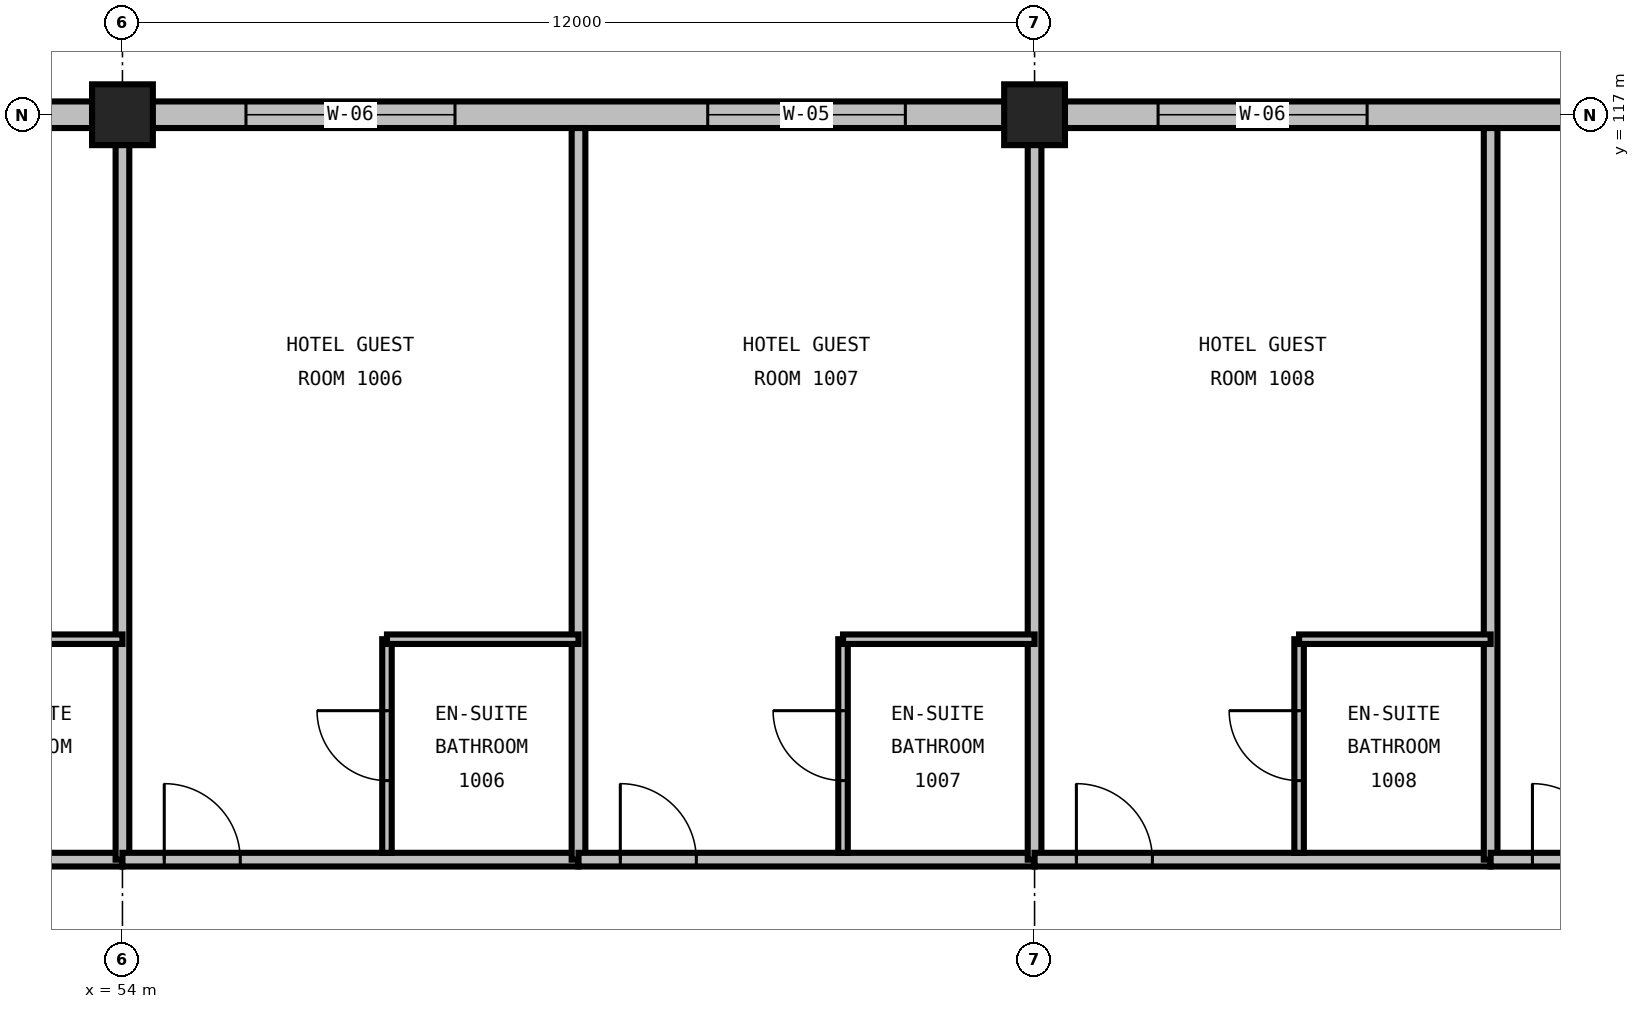
"""IFC4 building model, lengths in metres.
Left out: names, types, materials, properties, quantities, classifications, styles, units other than length and angle.
Written with IfcOpenShell. Run it as: python <this file> out.ifc"""

import sys

from ifc_helpers import new_model, si_unit, direction, frame, frame_2d, origin, origin_2d, place, context, subcontext, project, spatial, rectangle, extrude, element, fill, save


model = new_model("IFC4")
c1 = context("Model", 3, precision=1e-05, world=origin(), true_north=direction((0.0, 1.0)))
c2 = subcontext(c1, "Body", "Model", "MODEL_VIEW")
j1 = project(units=[si_unit("LENGTHUNIT", "METRE"), si_unit("PLANEANGLEUNIT", "RADIAN")], contexts=[c1])
p1 = place(None, origin())
s1 = spatial("IfcSite", under=j1, at=p1, CompositionType="ELEMENT")
p2 = place(p1, origin())
s2 = spatial("IfcBuilding", under=s1, at=p2, CompositionType="ELEMENT")
p3 = place(p2, frame((0.0, 0.0, 45.6)))
s3 = spatial("IfcBuildingStorey", under=s2, at=p3, CompositionType="ELEMENT", Elevation=45.6)
for number, where, z_axis, x_axis in (
    (1, (54.0, 117.0, 0.0), (0.0, 0.0, 1.0), (1.0, 0.0, 0.0)),
    (2, (66.0, 117.0, 0.0), (0.0, 0.0, 1.0), (1.0, 0.0, 0.0)),
):
    element("IfcColumn", number, at=place(p3, frame(where, z_axis=z_axis, x_axis=x_axis)), inside=s3, PredefinedType="COLUMN", context=c2, shape_type="SweptSolid", body=[
        extrude(rectangle(XDim=0.8, YDim=0.8, at=origin_2d()), origin(), (0.0, 0.0, 1.0), 3.6),
    ])
p4 = place(p3, frame((54.0, 117.0, 0.0), z_axis=(0.0, 0.0, 1.0), x_axis=(-1.0, 0.0, 0.0)))
e3 = element("IfcWall", 3, at=p4, inside=s3, PredefinedType="STANDARD", context=c2, shape_type="SweptSolid", body=[
    extrude(rectangle(XDim=12.0, YDim=0.35, at=frame_2d((6.0, 0.0))), origin(), (0.0, 0.0, 1.0), 2.486),
])
p5 = place(p4, frame((1.7, 0.0, 0.72)))
e4 = element("IfcOpeningElement", 4, at=p5, cuts=e3, PredefinedType="OPENING", context=c2, shape_type="SweptSolid", body=[
    extrude(rectangle(XDim=2.6, YDim=1.69, at=frame_2d((1.3, 0.845))), frame((0.0, 0.19, 0.0), z_axis=(0.0, -1.0, 0.0), x_axis=(1.0, 0.0, 0.0)), (0.0, 0.0, 1.0), 0.38),
])
p6 = place(p4, frame((7.625, 0.0, 0.72)))
e5 = element("IfcOpeningElement", 5, at=p6, cuts=e3, PredefinedType="OPENING", context=c2, shape_type="SweptSolid", body=[
    extrude(rectangle(XDim=2.75, YDim=1.69, at=frame_2d((1.375, 0.845))), frame((0.0, 0.19, 0.0), z_axis=(0.0, -1.0, 0.0), x_axis=(1.0, 0.0, 0.0)), (0.0, 0.0, 1.0), 0.38),
])
p7 = place(p3, frame((66.0, 117.0, 0.0), z_axis=(0.0, 0.0, 1.0), x_axis=(-1.0, 0.0, 0.0)))
e6 = element("IfcWall", 6, at=p7, inside=s3, PredefinedType="STANDARD", context=c2, shape_type="SweptSolid", body=[
    extrude(rectangle(XDim=12.0, YDim=0.35, at=frame_2d((6.0, 0.0))), origin(), (0.0, 0.0, 1.0), 2.486),
])
p8 = place(p7, frame((1.7, 0.0, 0.72)))
e7 = element("IfcOpeningElement", 7, at=p8, cuts=e6, PredefinedType="OPENING", context=c2, shape_type="SweptSolid", body=[
    extrude(rectangle(XDim=2.6, YDim=1.69, at=frame_2d((1.3, 0.845))), frame((0.0, 0.19, 0.0), z_axis=(0.0, -1.0, 0.0), x_axis=(1.0, 0.0, 0.0)), (0.0, 0.0, 1.0), 0.38),
])
p9 = place(p7, frame((7.625, 0.0, 0.72)))
e8 = element("IfcOpeningElement", 8, at=p9, cuts=e6, PredefinedType="OPENING", context=c2, shape_type="SweptSolid", body=[
    extrude(rectangle(XDim=2.75, YDim=1.69, at=frame_2d((1.375, 0.845))), frame((0.0, 0.19, 0.0), z_axis=(0.0, -1.0, 0.0), x_axis=(1.0, 0.0, 0.0)), (0.0, 0.0, 1.0), 0.38),
])
p10 = place(p3, frame((78.0, 117.0, 0.0), z_axis=(0.0, 0.0, 1.0), x_axis=(-1.0, 0.0, 0.0)))
e9 = element("IfcWall", 9, at=p10, inside=s3, PredefinedType="STANDARD", context=c2, shape_type="SweptSolid", body=[
    extrude(rectangle(XDim=12.0, YDim=0.35, at=frame_2d((6.0, 0.0))), origin(), (0.0, 0.0, 1.0), 2.486),
])
p11 = place(p10, frame((1.7, 0.0, 0.72)))
e10 = element("IfcOpeningElement", 10, at=p11, cuts=e9, PredefinedType="OPENING", context=c2, shape_type="SweptSolid", body=[
    extrude(rectangle(XDim=2.6, YDim=1.69, at=frame_2d((1.3, 0.845))), frame((0.0, 0.19, 0.0), z_axis=(0.0, -1.0, 0.0), x_axis=(1.0, 0.0, 0.0)), (0.0, 0.0, 1.0), 0.38),
])
p12 = place(p10, frame((7.625, 0.0, 0.72)))
e11 = element("IfcOpeningElement", 11, at=p12, cuts=e9, PredefinedType="OPENING", context=c2, shape_type="SweptSolid", body=[
    extrude(rectangle(XDim=2.75, YDim=1.69, at=frame_2d((1.375, 0.845))), frame((0.0, 0.19, 0.0), z_axis=(0.0, -1.0, 0.0), x_axis=(1.0, 0.0, 0.0)), (0.0, 0.0, 1.0), 0.38),
])
p13 = place(p3, frame((48.0, 107.2, 0.0), z_axis=(0.0, 0.0, 1.0), x_axis=(1.0, 0.0, 0.0)))
e12 = element("IfcWall", 12, at=p13, inside=s3, PredefinedType="PARTITIONING", context=c2, shape_type="SweptSolid", body=[
    extrude(rectangle(XDim=6.0, YDim=0.18, at=frame_2d((3.0, 0.0))), origin(), (0.0, 0.0, 1.0), 3.29),
])
p14 = place(p13, frame((0.55, 0.0, 0.0)))
e13 = element("IfcOpeningElement", 13, at=p14, cuts=e12, PredefinedType="OPENING", context=c2, shape_type="SweptSolid", body=[
    extrude(rectangle(XDim=1.0, YDim=2.15, at=frame_2d((0.5, 1.075))), frame((0.0, 0.105, 0.0), z_axis=(0.0, -1.0, 0.0), x_axis=(1.0, 0.0, 0.0)), (0.0, 0.0, 1.0), 0.21),
])
p15 = place(p3, frame((54.0, 107.2, 0.0), z_axis=(0.0, 0.0, 1.0), x_axis=(0.0, 1.0, 0.0)))
e14 = element("IfcWall", 14, at=p15, inside=s3, PredefinedType="PARTITIONING", context=c2, shape_type="SweptSolid", body=[
    extrude(rectangle(XDim=9.625, YDim=0.18, at=frame_2d((4.812, 0.0))), origin(), (0.0, 0.0, 1.0), 2.59),
])
p16 = place(p3, frame((51.48, 110.1, 0.0), z_axis=(0.0, 0.0, 1.0), x_axis=(1.0, 0.0, 0.0)))
e15 = element("IfcWall", 15, at=p16, inside=s3, PredefinedType="PARTITIONING", context=c2, shape_type="SweptSolid", body=[
    extrude(rectangle(XDim=2.52, YDim=0.125, at=frame_2d((1.26, 0.0))), origin(), (0.0, 0.0, 1.0), 3.29),
])
p17 = place(p3, frame((54.0, 107.2, 0.0), z_axis=(0.0, 0.0, 1.0), x_axis=(1.0, 0.0, 0.0)))
e16 = element("IfcWall", 16, at=p17, inside=s3, PredefinedType="PARTITIONING", context=c2, shape_type="SweptSolid", body=[
    extrude(rectangle(XDim=6.0, YDim=0.18, at=frame_2d((3.0, 0.0))), origin(), (0.0, 0.0, 1.0), 3.29),
])
p18 = place(p17, frame((0.55, 0.0, 0.0)))
e17 = element("IfcOpeningElement", 17, at=p18, cuts=e16, PredefinedType="OPENING", context=c2, shape_type="SweptSolid", body=[
    extrude(rectangle(XDim=1.0, YDim=2.15, at=frame_2d((0.5, 1.075))), frame((0.0, 0.105, 0.0), z_axis=(0.0, -1.0, 0.0), x_axis=(1.0, 0.0, 0.0)), (0.0, 0.0, 1.0), 0.21),
])
p19 = place(p3, frame((60.0, 107.2, 0.0), z_axis=(0.0, 0.0, 1.0), x_axis=(0.0, 1.0, 0.0)))
e18 = element("IfcWall", 18, at=p19, inside=s3, PredefinedType="PARTITIONING", context=c2, shape_type="SweptSolid", body=[
    extrude(rectangle(XDim=9.625, YDim=0.18, at=frame_2d((4.812, 0.0))), origin(), (0.0, 0.0, 1.0), 3.29),
])
p20 = place(p3, frame((57.48, 107.29, 0.0), z_axis=(0.0, 0.0, 1.0), x_axis=(0.0, 1.0, 0.0)))
e19 = element("IfcWall", 19, at=p20, inside=s3, PredefinedType="PARTITIONING", context=c2, shape_type="SweptSolid", body=[
    extrude(rectangle(XDim=2.81, YDim=0.125, at=frame_2d((1.405, 0.0))), origin(), (0.0, 0.0, 1.0), 3.29),
])
p21 = place(p20, frame((0.95, 0.0, 0.0)))
e20 = element("IfcOpeningElement", 20, at=p21, cuts=e19, PredefinedType="OPENING", context=c2, shape_type="SweptSolid", body=[
    extrude(rectangle(XDim=0.92, YDim=2.1, at=frame_2d((0.46, 1.05))), frame((0.0, 0.077, 0.0), z_axis=(0.0, -1.0, 0.0), x_axis=(1.0, 0.0, 0.0)), (0.0, 0.0, 1.0), 0.155),
])
p22 = place(p3, frame((57.48, 110.1, 0.0), z_axis=(0.0, 0.0, 1.0), x_axis=(1.0, 0.0, 0.0)))
e21 = element("IfcWall", 21, at=p22, inside=s3, PredefinedType="PARTITIONING", context=c2, shape_type="SweptSolid", body=[
    extrude(rectangle(XDim=2.52, YDim=0.125, at=frame_2d((1.26, 0.0))), origin(), (0.0, 0.0, 1.0), 3.29),
])
p23 = place(p3, frame((60.0, 107.2, 0.0), z_axis=(0.0, 0.0, 1.0), x_axis=(1.0, 0.0, 0.0)))
e22 = element("IfcWall", 22, at=p23, inside=s3, PredefinedType="PARTITIONING", context=c2, shape_type="SweptSolid", body=[
    extrude(rectangle(XDim=6.0, YDim=0.18, at=frame_2d((3.0, 0.0))), origin(), (0.0, 0.0, 1.0), 3.29),
])
p24 = place(p23, frame((0.55, 0.0, 0.0)))
e23 = element("IfcOpeningElement", 23, at=p24, cuts=e22, PredefinedType="OPENING", context=c2, shape_type="SweptSolid", body=[
    extrude(rectangle(XDim=1.0, YDim=2.15, at=frame_2d((0.5, 1.075))), frame((0.0, 0.105, 0.0), z_axis=(0.0, -1.0, 0.0), x_axis=(1.0, 0.0, 0.0)), (0.0, 0.0, 1.0), 0.21),
])
p25 = place(p3, frame((66.0, 107.2, 0.0), z_axis=(0.0, 0.0, 1.0), x_axis=(0.0, 1.0, 0.0)))
e24 = element("IfcWall", 24, at=p25, inside=s3, PredefinedType="PARTITIONING", context=c2, shape_type="SweptSolid", body=[
    extrude(rectangle(XDim=9.625, YDim=0.18, at=frame_2d((4.812, 0.0))), origin(), (0.0, 0.0, 1.0), 2.59),
])
p26 = place(p3, frame((63.48, 107.29, 0.0), z_axis=(0.0, 0.0, 1.0), x_axis=(0.0, 1.0, 0.0)))
e25 = element("IfcWall", 25, at=p26, inside=s3, PredefinedType="PARTITIONING", context=c2, shape_type="SweptSolid", body=[
    extrude(rectangle(XDim=2.81, YDim=0.125, at=frame_2d((1.405, 0.0))), origin(), (0.0, 0.0, 1.0), 3.29),
])
p27 = place(p26, frame((0.95, 0.0, 0.0)))
e26 = element("IfcOpeningElement", 26, at=p27, cuts=e25, PredefinedType="OPENING", context=c2, shape_type="SweptSolid", body=[
    extrude(rectangle(XDim=0.92, YDim=2.1, at=frame_2d((0.46, 1.05))), frame((0.0, 0.077, 0.0), z_axis=(0.0, -1.0, 0.0), x_axis=(1.0, 0.0, 0.0)), (0.0, 0.0, 1.0), 0.155),
])
p28 = place(p3, frame((63.48, 110.1, 0.0), z_axis=(0.0, 0.0, 1.0), x_axis=(1.0, 0.0, 0.0)))
e27 = element("IfcWall", 27, at=p28, inside=s3, PredefinedType="PARTITIONING", context=c2, shape_type="SweptSolid", body=[
    extrude(rectangle(XDim=2.52, YDim=0.125, at=frame_2d((1.26, 0.0))), origin(), (0.0, 0.0, 1.0), 3.29),
])
p29 = place(p3, frame((66.0, 107.2, 0.0), z_axis=(0.0, 0.0, 1.0), x_axis=(1.0, 0.0, 0.0)))
e28 = element("IfcWall", 28, at=p29, inside=s3, PredefinedType="PARTITIONING", context=c2, shape_type="SweptSolid", body=[
    extrude(rectangle(XDim=6.0, YDim=0.18, at=frame_2d((3.0, 0.0))), origin(), (0.0, 0.0, 1.0), 3.29),
])
p30 = place(p29, frame((0.55, 0.0, 0.0)))
e29 = element("IfcOpeningElement", 29, at=p30, cuts=e28, PredefinedType="OPENING", context=c2, shape_type="SweptSolid", body=[
    extrude(rectangle(XDim=1.0, YDim=2.15, at=frame_2d((0.5, 1.075))), frame((0.0, 0.105, 0.0), z_axis=(0.0, -1.0, 0.0), x_axis=(1.0, 0.0, 0.0)), (0.0, 0.0, 1.0), 0.21),
])
p31 = place(p3, frame((72.0, 107.2, 0.0), z_axis=(0.0, 0.0, 1.0), x_axis=(0.0, 1.0, 0.0)))
e30 = element("IfcWall", 30, at=p31, inside=s3, PredefinedType="PARTITIONING", context=c2, shape_type="SweptSolid", body=[
    extrude(rectangle(XDim=9.625, YDim=0.18, at=frame_2d((4.812, 0.0))), origin(), (0.0, 0.0, 1.0), 3.29),
])
p32 = place(p3, frame((69.48, 107.29, 0.0), z_axis=(0.0, 0.0, 1.0), x_axis=(0.0, 1.0, 0.0)))
e31 = element("IfcWall", 31, at=p32, inside=s3, PredefinedType="PARTITIONING", context=c2, shape_type="SweptSolid", body=[
    extrude(rectangle(XDim=2.81, YDim=0.125, at=frame_2d((1.405, 0.0))), origin(), (0.0, 0.0, 1.0), 3.29),
])
p33 = place(p32, frame((0.95, 0.0, 0.0)))
e32 = element("IfcOpeningElement", 32, at=p33, cuts=e31, PredefinedType="OPENING", context=c2, shape_type="SweptSolid", body=[
    extrude(rectangle(XDim=0.92, YDim=2.1, at=frame_2d((0.46, 1.05))), frame((0.0, 0.077, 0.0), z_axis=(0.0, -1.0, 0.0), x_axis=(1.0, 0.0, 0.0)), (0.0, 0.0, 1.0), 0.155),
])
p34 = place(p3, frame((69.48, 110.1, 0.0), z_axis=(0.0, 0.0, 1.0), x_axis=(1.0, 0.0, 0.0)))
e33 = element("IfcWall", 33, at=p34, inside=s3, PredefinedType="PARTITIONING", context=c2, shape_type="SweptSolid", body=[
    extrude(rectangle(XDim=2.52, YDim=0.125, at=frame_2d((1.26, 0.0))), origin(), (0.0, 0.0, 1.0), 3.29),
])
p35 = place(p3, frame((72.0, 107.2, 0.0), z_axis=(0.0, 0.0, 1.0), x_axis=(1.0, 0.0, 0.0)))
e34 = element("IfcWall", 34, at=p35, inside=s3, PredefinedType="PARTITIONING", context=c2, shape_type="SweptSolid", body=[
    extrude(rectangle(XDim=6.0, YDim=0.18, at=frame_2d((3.0, 0.0))), origin(), (0.0, 0.0, 1.0), 3.29),
])
p36 = place(p35, frame((0.55, 0.0, 0.0)))
e35 = element("IfcOpeningElement", 35, at=p36, cuts=e34, PredefinedType="OPENING", context=c2, shape_type="SweptSolid", body=[
    extrude(rectangle(XDim=1.0, YDim=2.15, at=frame_2d((0.5, 1.075))), frame((0.0, 0.105, 0.0), z_axis=(0.0, -1.0, 0.0), x_axis=(1.0, 0.0, 0.0)), (0.0, 0.0, 1.0), 0.21),
])
p37 = place(p8, origin())
e36 = element("IfcWindow", 36, at=p37, inside=s3, PartitioningType="DOUBLE_PANEL_VERTICAL", PredefinedType="WINDOW", context=c2, shape_type="SweptSolid", body=[
    extrude(rectangle(XDim=2.6, YDim=1.69, at=frame_2d((1.3, 0.845))), frame((0.0, 0.03, 0.0), z_axis=(0.0, -1.0, 0.0), x_axis=(1.0, 0.0, 0.0)), (0.0, 0.0, 1.0), 0.06),
])
fill(e7, e36)
p38 = place(p9, origin())
e37 = element("IfcWindow", 37, at=p38, inside=s3, PartitioningType="TRIPLE_PANEL_VERTICAL", PredefinedType="WINDOW", context=c2, shape_type="SweptSolid", body=[
    extrude(rectangle(XDim=2.75, YDim=1.69, at=frame_2d((1.375, 0.845))), frame((0.0, 0.03, 0.0), z_axis=(0.0, -1.0, 0.0), x_axis=(1.0, 0.0, 0.0)), (0.0, 0.0, 1.0), 0.06),
])
fill(e8, e37)
p39 = place(p12, origin())
e38 = element("IfcWindow", 38, at=p39, inside=s3, PartitioningType="TRIPLE_PANEL_VERTICAL", PredefinedType="WINDOW", context=c2, shape_type="SweptSolid", body=[
    extrude(rectangle(XDim=2.75, YDim=1.69, at=frame_2d((1.375, 0.845))), frame((0.0, 0.03, 0.0), z_axis=(0.0, -1.0, 0.0), x_axis=(1.0, 0.0, 0.0)), (0.0, 0.0, 1.0), 0.06),
])
fill(e11, e38)
p40 = place(p18, origin())
e39 = element("IfcDoor", 39, at=p40, inside=s3, OperationType="SINGLE_SWING_LEFT", PredefinedType="DOOR", context=c2, shape_type="SweptSolid", body=[
    extrude(rectangle(XDim=1.0, YDim=2.15, at=frame_2d((0.5, 1.075))), frame((0.0, 0.025, 0.0), z_axis=(0.0, -1.0, 0.0), x_axis=(1.0, 0.0, 0.0)), (0.0, 0.0, 1.0), 0.05),
])
fill(e17, e39)
p41 = place(p21, origin())
e40 = element("IfcDoor", 40, at=p41, inside=s3, OperationType="SINGLE_SWING_RIGHT", PredefinedType="DOOR", context=c2, shape_type="SweptSolid", body=[
    extrude(rectangle(XDim=0.92, YDim=2.1, at=frame_2d((0.46, 1.05))), frame((0.0, 0.025, 0.0), z_axis=(0.0, -1.0, 0.0), x_axis=(1.0, 0.0, 0.0)), (0.0, 0.0, 1.0), 0.05),
])
fill(e20, e40)
p42 = place(p24, origin())
e41 = element("IfcDoor", 41, at=p42, inside=s3, OperationType="SINGLE_SWING_LEFT", PredefinedType="DOOR", context=c2, shape_type="SweptSolid", body=[
    extrude(rectangle(XDim=1.0, YDim=2.15, at=frame_2d((0.5, 1.075))), frame((0.0, 0.025, 0.0), z_axis=(0.0, -1.0, 0.0), x_axis=(1.0, 0.0, 0.0)), (0.0, 0.0, 1.0), 0.05),
])
fill(e23, e41)
p43 = place(p27, origin())
e42 = element("IfcDoor", 42, at=p43, inside=s3, OperationType="SINGLE_SWING_RIGHT", PredefinedType="DOOR", context=c2, shape_type="SweptSolid", body=[
    extrude(rectangle(XDim=0.92, YDim=2.1, at=frame_2d((0.46, 1.05))), frame((0.0, 0.025, 0.0), z_axis=(0.0, -1.0, 0.0), x_axis=(1.0, 0.0, 0.0)), (0.0, 0.0, 1.0), 0.05),
])
fill(e26, e42)
p44 = place(p30, origin())
e43 = element("IfcDoor", 43, at=p44, inside=s3, OperationType="SINGLE_SWING_LEFT", PredefinedType="DOOR", context=c2, shape_type="SweptSolid", body=[
    extrude(rectangle(XDim=1.0, YDim=2.15, at=frame_2d((0.5, 1.075))), frame((0.0, 0.025, 0.0), z_axis=(0.0, -1.0, 0.0), x_axis=(1.0, 0.0, 0.0)), (0.0, 0.0, 1.0), 0.05),
])
fill(e29, e43)
p45 = place(p33, origin())
e44 = element("IfcDoor", 44, at=p45, inside=s3, OperationType="SINGLE_SWING_RIGHT", PredefinedType="DOOR", context=c2, shape_type="SweptSolid", body=[
    extrude(rectangle(XDim=0.92, YDim=2.1, at=frame_2d((0.46, 1.05))), frame((0.0, 0.025, 0.0), z_axis=(0.0, -1.0, 0.0), x_axis=(1.0, 0.0, 0.0)), (0.0, 0.0, 1.0), 0.05),
])
fill(e32, e44)
p46 = place(p36, origin())
e45 = element("IfcDoor", 45, at=p46, inside=s3, OperationType="SINGLE_SWING_LEFT", PredefinedType="DOOR", context=c2, shape_type="SweptSolid", body=[
    extrude(rectangle(XDim=1.0, YDim=2.15, at=frame_2d((0.5, 1.075))), frame((0.0, 0.025, 0.0), z_axis=(0.0, -1.0, 0.0), x_axis=(1.0, 0.0, 0.0)), (0.0, 0.0, 1.0), 0.05),
])
fill(e35, e45)
save(model, sys.argv[1])
